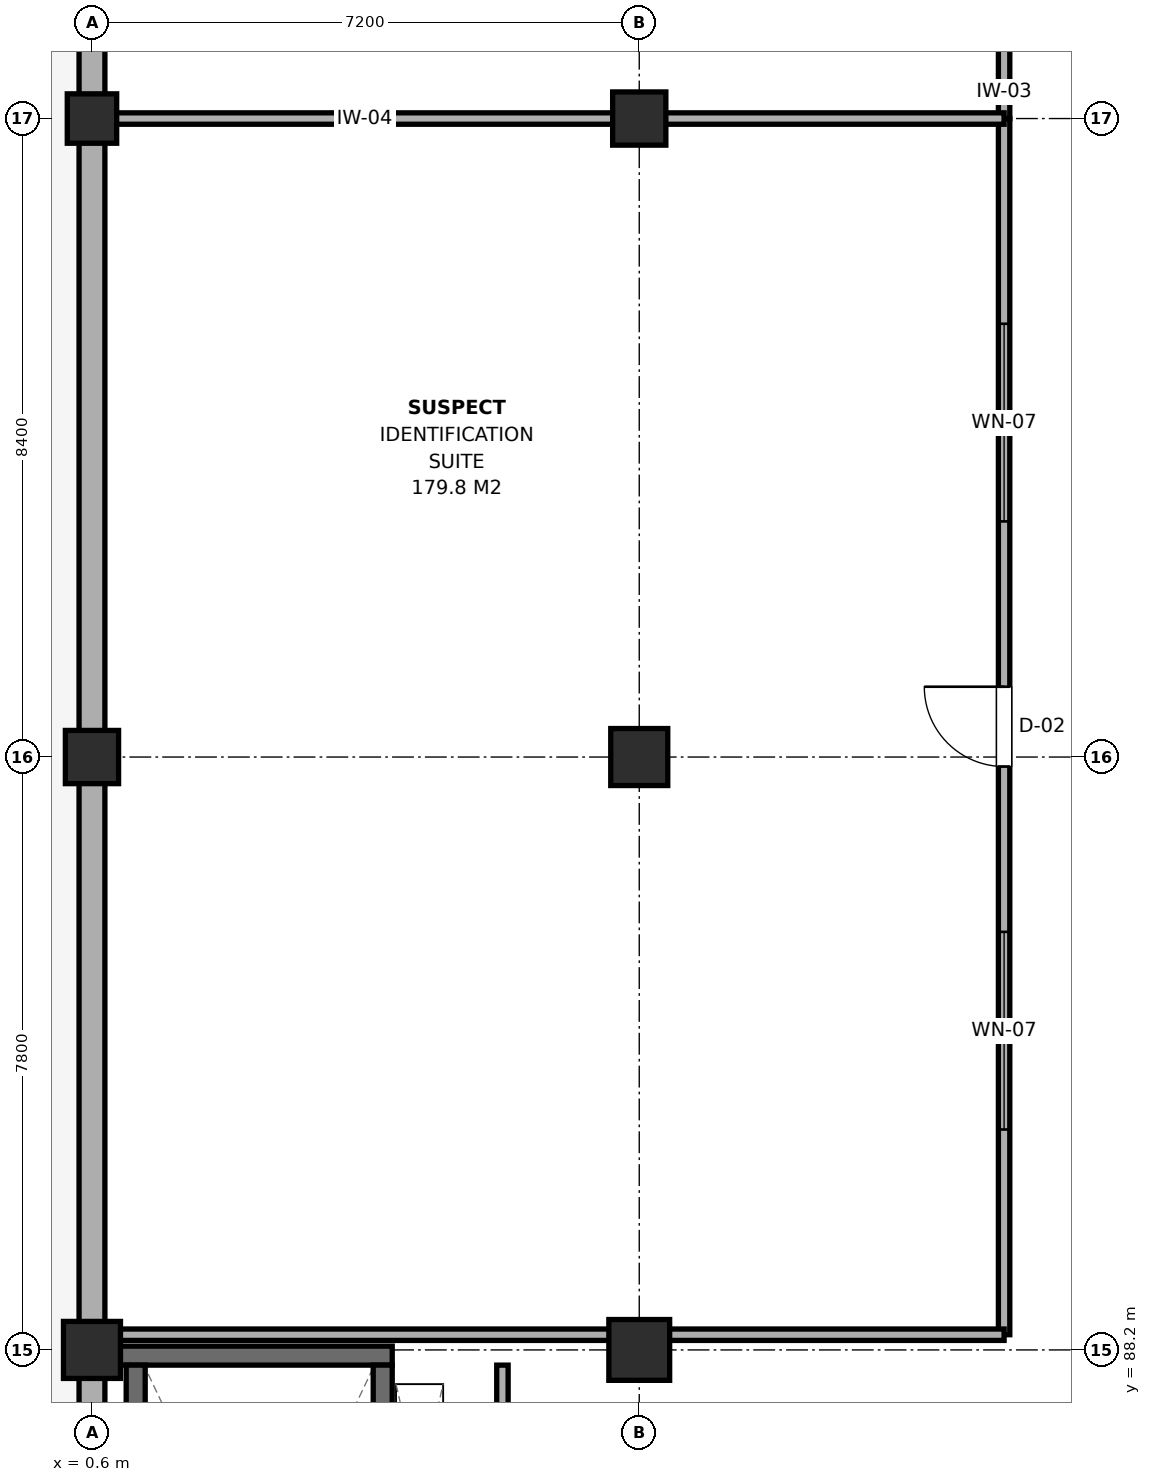
"""IFC4 building model, lengths in metres.
Left out: names, types, materials, properties, quantities, classifications, styles, units other than length and angle.
Written with IfcOpenShell. Run it as: python <this file> out.ifc"""

import sys

from ifc_helpers import new_model, si_unit, direction, frame, frame_2d, origin, origin_2d, place, context, subcontext, project, spatial, rectangle, extrude, element, fill, save


model = new_model("IFC4")
c1 = context("Model", 3, precision=1e-05, world=origin(), true_north=direction((0.0, 1.0)))
c2 = subcontext(c1, "Body", "Model", "MODEL_VIEW")
j1 = project(units=[si_unit("LENGTHUNIT", "METRE"), si_unit("PLANEANGLEUNIT", "RADIAN")], contexts=[c1])
p1 = place(None, origin())
s1 = spatial("IfcSite", under=j1, at=p1, CompositionType="ELEMENT")
p2 = place(p1, origin())
s2 = spatial("IfcBuilding", under=s1, at=p2, CompositionType="ELEMENT")
p3 = place(p2, frame((0.0, 0.0, 4.8)))
s3 = spatial("IfcBuildingStorey", under=s2, at=p3, CompositionType="ELEMENT", Elevation=4.8)
p4 = place(p3, frame((0.6, 88.2, 0.0), z_axis=(0.0, 0.0, 1.0), x_axis=(1.0, 0.0, 0.0)))
e1 = element("IfcColumn", 1, at=p4, inside=s3, PredefinedType="COLUMN", context=c2, shape_type="SweptSolid", body=[
    extrude(rectangle(XDim=0.75, YDim=0.75, at=origin_2d()), origin(), (0.0, 0.0, 1.0), 4.2),
])
p5 = place(p3, frame((0.6, 96.0, 0.0), z_axis=(0.0, 0.0, 1.0), x_axis=(1.0, 0.0, 0.0)))
e2 = element("IfcColumn", 2, at=p5, inside=s3, PredefinedType="COLUMN", context=c2, shape_type="SweptSolid", body=[
    extrude(rectangle(XDim=0.7, YDim=0.7, at=origin_2d()), origin(), (0.0, 0.0, 1.0), 4.2),
])
p6 = place(p3, frame((0.6, 104.4, 0.0), z_axis=(0.0, 0.0, 1.0), x_axis=(1.0, 0.0, 0.0)))
e3 = element("IfcColumn", 3, at=p6, inside=s3, PredefinedType="COLUMN", context=c2, shape_type="SweptSolid", body=[
    extrude(rectangle(XDim=0.65, YDim=0.65, at=origin_2d()), origin(), (0.0, 0.0, 1.0), 4.2),
])
p7 = place(p3, frame((7.8, 88.2, 0.0), z_axis=(0.0, 0.0, 1.0), x_axis=(1.0, 0.0, 0.0)))
e4 = element("IfcColumn", 4, at=p7, inside=s3, PredefinedType="COLUMN", context=c2, shape_type="SweptSolid", body=[
    extrude(rectangle(XDim=0.8, YDim=0.8, at=origin_2d()), origin(), (0.0, 0.0, 1.0), 4.2),
])
p8 = place(p3, frame((7.8, 96.0, 0.0), z_axis=(0.0, 0.0, 1.0), x_axis=(1.0, 0.0, 0.0)))
e5 = element("IfcColumn", 5, at=p8, inside=s3, PredefinedType="COLUMN", context=c2, shape_type="SweptSolid", body=[
    extrude(rectangle(XDim=0.75, YDim=0.75, at=origin_2d()), origin(), (0.0, 0.0, 1.0), 4.2),
])
p9 = place(p3, frame((7.8, 104.4, 0.0), z_axis=(0.0, 0.0, 1.0), x_axis=(1.0, 0.0, 0.0)))
e6 = element("IfcColumn", 6, at=p9, inside=s3, PredefinedType="COLUMN", context=c2, shape_type="SweptSolid", body=[
    extrude(rectangle(XDim=0.7, YDim=0.7, at=origin_2d()), origin(), (0.0, 0.0, 1.0), 4.2),
])
p10 = place(p3, frame((0.75, 88.125, 0.0), z_axis=(0.0, 0.0, 1.0), x_axis=(1.0, 0.0, 0.0)))
e7 = element("IfcWall", 7, at=p10, inside=s3, PredefinedType="SHEAR", context=c2, shape_type="SweptSolid", body=[
    extrude(rectangle(XDim=3.8, YDim=0.25, at=frame_2d((1.9, 0.0))), origin(), (0.0, 0.0, 1.0), 3.98),
])
p11 = place(p3, frame((1.175, 81.6, 0.0), z_axis=(0.0, 0.0, 1.0), x_axis=(0.0, 1.0, 0.0)))
e8 = element("IfcWall", 8, at=p11, inside=s3, PredefinedType="SHEAR", context=c2, shape_type="SweptSolid", body=[
    extrude(rectangle(XDim=6.4, YDim=0.25, at=frame_2d((3.2, 0.0))), origin(), (0.0, 0.0, 1.0), 3.98),
])
p12 = place(p3, frame((4.425, 81.6, 0.0), z_axis=(0.0, 0.0, 1.0), x_axis=(0.0, 1.0, 0.0)))
e9 = element("IfcWall", 9, at=p12, inside=s3, PredefinedType="SHEAR", context=c2, shape_type="SweptSolid", body=[
    extrude(rectangle(XDim=6.4, YDim=0.25, at=frame_2d((3.2, 0.0))), origin(), (0.0, 0.0, 1.0), 3.98),
])
p13 = place(p12, frame((0.17, 0.0, 0.0)))
e10 = element("IfcOpeningElement", 10, at=p13, cuts=e9, PredefinedType="OPENING", context=c2, shape_type="SweptSolid", body=[
    extrude(rectangle(XDim=1.1, YDim=2.15, at=frame_2d((0.55, 1.075))), frame((0.0, 0.14, 0.0), z_axis=(0.0, -1.0, 0.0), x_axis=(1.0, 0.0, 0.0)), (0.0, 0.0, 1.0), 0.28),
])
p14 = place(p3, frame((0.6, 81.0, 0.0), z_axis=(0.0, 0.0, 1.0), x_axis=(0.0, 1.0, 0.0)))
e11 = element("IfcWall", 11, at=p14, inside=s3, PredefinedType="SOLIDWALL", context=c2, shape_type="SweptSolid", body=[
    extrude(rectangle(XDim=7.2, YDim=0.34, at=frame_2d((3.6, 0.0))), origin(), (0.0, 0.0, 1.0), 3.625),
])
p15 = place(p3, frame((0.6, 88.2, 0.0), z_axis=(0.0, 0.0, 1.0), x_axis=(0.0, 1.0, 0.0)))
e12 = element("IfcWall", 12, at=p15, inside=s3, PredefinedType="SOLIDWALL", context=c2, shape_type="SweptSolid", body=[
    extrude(rectangle(XDim=7.8, YDim=0.34, at=frame_2d((3.9, 0.0))), origin(), (0.0, 0.0, 1.0), 3.645),
])
p16 = place(p3, frame((0.6, 96.0, 0.0), z_axis=(0.0, 0.0, 1.0), x_axis=(0.0, 1.0, 0.0)))
e13 = element("IfcWall", 13, at=p16, inside=s3, PredefinedType="SOLIDWALL", context=c2, shape_type="SweptSolid", body=[
    extrude(rectangle(XDim=8.4, YDim=0.34, at=frame_2d((4.2, 0.0))), origin(), (0.0, 0.0, 1.0), 3.485),
])
p17 = place(p3, frame((0.6, 104.4, 0.0), z_axis=(0.0, 0.0, 1.0), x_axis=(0.0, 1.0, 0.0)))
e14 = element("IfcWall", 14, at=p17, inside=s3, PredefinedType="SOLIDWALL", context=c2, shape_type="SweptSolid", body=[
    extrude(rectangle(XDim=9.0, YDim=0.34, at=frame_2d((4.5, 0.0))), origin(), (0.0, 0.0, 1.0), 3.535),
])
p18 = place(p3, frame((6.0, 84.8, 0.0), z_axis=(0.0, 0.0, 1.0), x_axis=(0.0, 1.0, 0.0)))
e15 = element("IfcWall", 15, at=p18, inside=s3, PredefinedType="PARTITIONING", context=c2, shape_type="SweptSolid", body=[
    extrude(rectangle(XDim=3.2, YDim=0.15, at=frame_2d((1.6, 0.0))), origin(), (0.0, 0.0, 1.0), 3.645),
])
p19 = place(p18, frame((1.175, 0.0, 0.0)))
e16 = element("IfcOpeningElement", 16, at=p19, cuts=e15, PredefinedType="OPENING", context=c2, shape_type="SweptSolid", body=[
    extrude(rectangle(XDim=0.85, YDim=2.1, at=frame_2d((0.425, 1.05))), frame((0.0, 0.09, 0.0), z_axis=(0.0, -1.0, 0.0), x_axis=(1.0, 0.0, 0.0)), (0.0, 0.0, 1.0), 0.18),
])
p20 = place(p3, frame((12.6, 88.4, 0.0), z_axis=(0.0, 0.0, 1.0), x_axis=(0.0, 1.0, 0.0)))
e17 = element("IfcWall", 17, at=p20, inside=s3, PredefinedType="PARTITIONING", context=c2, shape_type="SweptSolid", body=[
    extrude(rectangle(XDim=16.0, YDim=0.15, at=frame_2d((8.0, 0.0))), origin(), (0.0, 0.0, 1.0), 3.375),
])
p21 = place(p20, frame((7.475, 0.0, 0.0)))
e18 = element("IfcOpeningElement", 18, at=p21, cuts=e17, PredefinedType="OPENING", context=c2, shape_type="SweptSolid", body=[
    extrude(rectangle(XDim=1.05, YDim=2.15, at=frame_2d((0.525, 1.075))), frame((0.0, 0.09, 0.0), z_axis=(0.0, -1.0, 0.0), x_axis=(1.0, 0.0, 0.0)), (0.0, 0.0, 1.0), 0.18),
])
p22 = place(p20, frame((2.7, 0.0, 0.95)))
e19 = element("IfcOpeningElement", 19, at=p22, cuts=e17, PredefinedType="OPENING", context=c2, shape_type="SweptSolid", body=[
    extrude(rectangle(XDim=2.6, YDim=1.5, at=frame_2d((1.3, 0.75))), frame((0.0, 0.09, 0.0), z_axis=(0.0, -1.0, 0.0), x_axis=(1.0, 0.0, 0.0)), (0.0, 0.0, 1.0), 0.18),
])
p23 = place(p20, frame((10.7, 0.0, 0.95)))
e20 = element("IfcOpeningElement", 20, at=p23, cuts=e17, PredefinedType="OPENING", context=c2, shape_type="SweptSolid", body=[
    extrude(rectangle(XDim=2.6, YDim=1.5, at=frame_2d((1.3, 0.75))), frame((0.0, 0.09, 0.0), z_axis=(0.0, -1.0, 0.0), x_axis=(1.0, 0.0, 0.0)), (0.0, 0.0, 1.0), 0.18),
])
p24 = place(p3, frame((0.78, 88.4, 0.0), z_axis=(0.0, 0.0, 1.0), x_axis=(1.0, 0.0, 0.0)))
e21 = element("IfcWall", 21, at=p24, inside=s3, PredefinedType="PARTITIONING", context=c2, shape_type="SweptSolid", body=[
    extrude(rectangle(XDim=11.82, YDim=0.15, at=frame_2d((5.91, 0.0))), origin(), (0.0, 0.0, 1.0), 3.375),
])
p25 = place(p3, frame((12.6, 104.4, 0.0), z_axis=(0.0, 0.0, 1.0), x_axis=(0.0, 1.0, 0.0)))
e22 = element("IfcWall", 22, at=p25, inside=s3, PredefinedType="PARTITIONING", context=c2, shape_type="SweptSolid", body=[
    extrude(rectangle(XDim=18.0, YDim=0.15, at=frame_2d((9.0, 0.0))), origin(), (0.0, 0.0, 1.0), 3.375),
])
p26 = place(p25, frame((8.2, 0.0, 0.0)))
e23 = element("IfcOpeningElement", 23, at=p26, cuts=e22, PredefinedType="OPENING", context=c2, shape_type="SweptSolid", body=[
    extrude(rectangle(XDim=1.6, YDim=2.15, at=frame_2d((0.8, 1.075))), frame((0.0, 0.09, 0.0), z_axis=(0.0, -1.0, 0.0), x_axis=(1.0, 0.0, 0.0)), (0.0, 0.0, 1.0), 0.18),
])
p27 = place(p25, frame((3.2, 0.0, 0.95)))
e24 = element("IfcOpeningElement", 24, at=p27, cuts=e22, PredefinedType="OPENING", context=c2, shape_type="SweptSolid", body=[
    extrude(rectangle(XDim=2.6, YDim=1.5, at=frame_2d((1.3, 0.75))), frame((0.0, 0.09, 0.0), z_axis=(0.0, -1.0, 0.0), x_axis=(1.0, 0.0, 0.0)), (0.0, 0.0, 1.0), 0.18),
])
p28 = place(p25, frame((12.2, 0.0, 0.95)))
e25 = element("IfcOpeningElement", 25, at=p28, cuts=e22, PredefinedType="OPENING", context=c2, shape_type="SweptSolid", body=[
    extrude(rectangle(XDim=2.6, YDim=1.5, at=frame_2d((1.3, 0.75))), frame((0.0, 0.09, 0.0), z_axis=(0.0, -1.0, 0.0), x_axis=(1.0, 0.0, 0.0)), (0.0, 0.0, 1.0), 0.18),
])
p29 = place(p3, frame((0.78, 104.4, 0.0), z_axis=(0.0, 0.0, 1.0), x_axis=(1.0, 0.0, 0.0)))
e26 = element("IfcWall", 26, at=p29, inside=s3, PredefinedType="PARTITIONING", context=c2, shape_type="SweptSolid", body=[
    extrude(rectangle(XDim=11.82, YDim=0.15, at=frame_2d((5.91, 0.0))), origin(), (0.0, 0.0, 1.0), 3.525),
])
p30 = place(p21, origin())
e27 = element("IfcDoor", 27, at=p30, inside=s3, OperationType="SINGLE_SWING_RIGHT", PredefinedType="DOOR", context=c2, shape_type="SweptSolid", body=[
    extrude(rectangle(XDim=1.05, YDim=2.15, at=frame_2d((0.525, 1.075))), frame((0.0, 0.025, 0.0), z_axis=(0.0, -1.0, 0.0), x_axis=(1.0, 0.0, 0.0)), (0.0, 0.0, 1.0), 0.05),
])
fill(e18, e27)
p31 = place(p22, origin())
e28 = element("IfcWindow", 28, at=p31, inside=s3, PartitioningType="SINGLE_PANEL", PredefinedType="WINDOW", context=c2, shape_type="SweptSolid", body=[
    extrude(rectangle(XDim=2.6, YDim=1.5, at=frame_2d((1.3, 0.75))), frame((0.0, 0.03, 0.0), z_axis=(0.0, -1.0, 0.0), x_axis=(1.0, 0.0, 0.0)), (0.0, 0.0, 1.0), 0.06),
])
fill(e19, e28)
p32 = place(p23, origin())
e29 = element("IfcWindow", 29, at=p32, inside=s3, PartitioningType="SINGLE_PANEL", PredefinedType="WINDOW", context=c2, shape_type="SweptSolid", body=[
    extrude(rectangle(XDim=2.6, YDim=1.5, at=frame_2d((1.3, 0.75))), frame((0.0, 0.03, 0.0), z_axis=(0.0, -1.0, 0.0), x_axis=(1.0, 0.0, 0.0)), (0.0, 0.0, 1.0), 0.06),
])
fill(e20, e29)
save(model, sys.argv[1])
